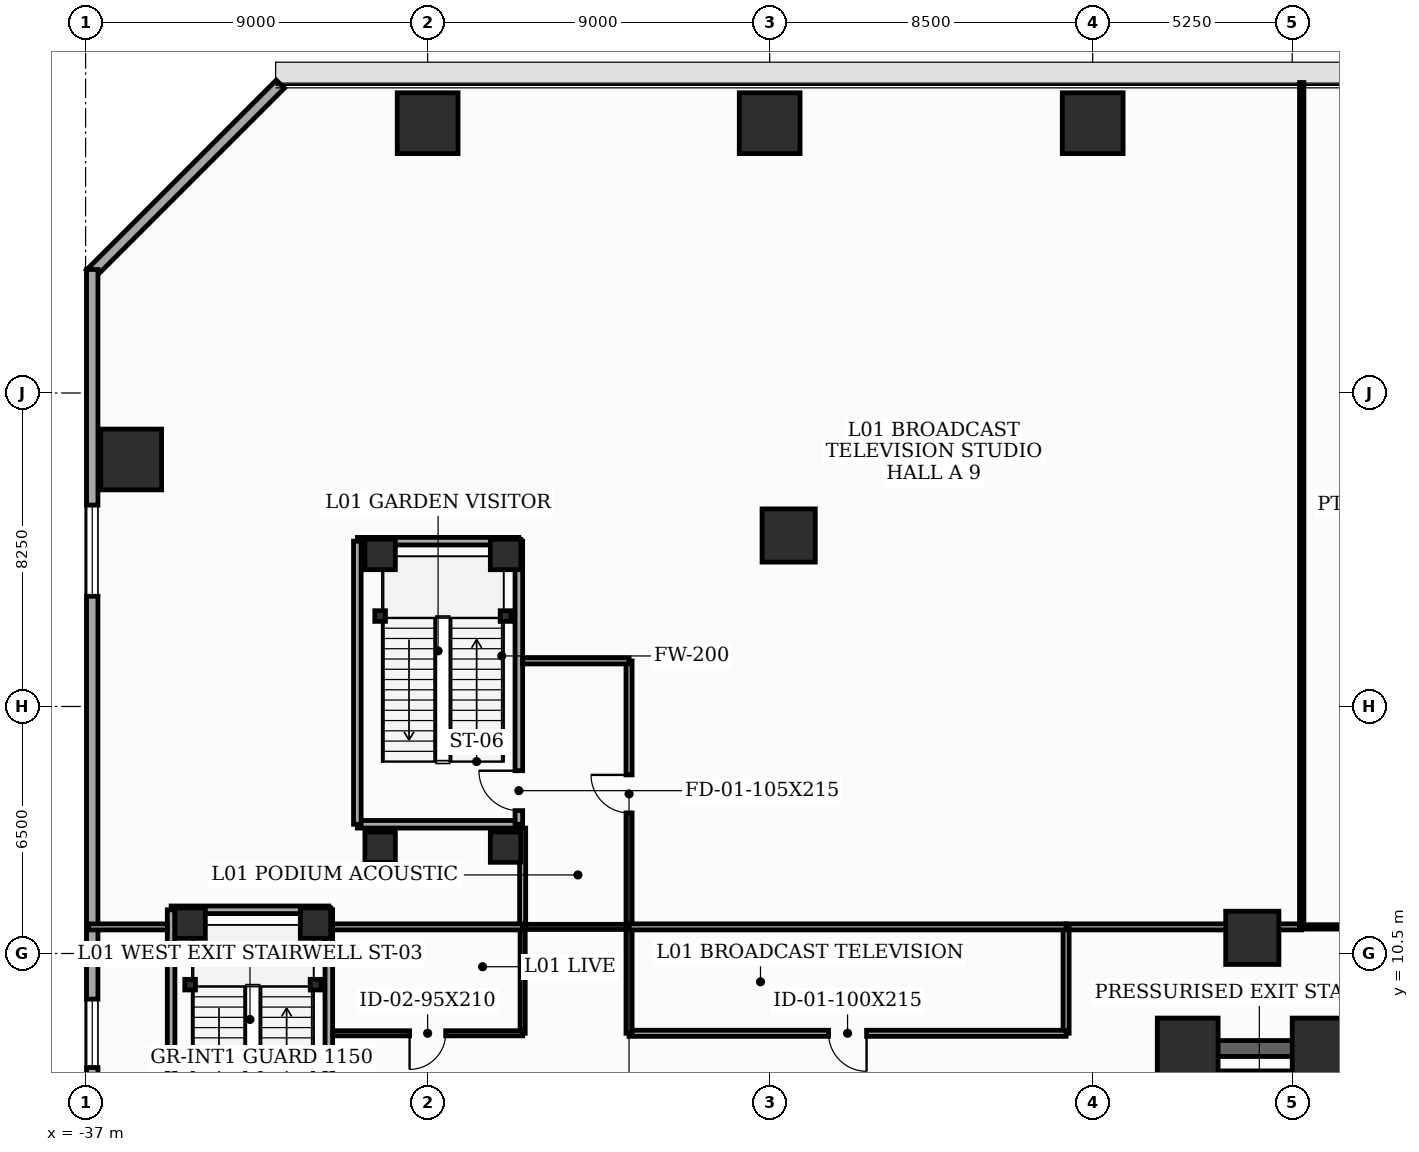
"""IFC4 building model, lengths in metres.
Left out: names, types, materials, properties, quantities, classifications, styles, units other than length and angle.
Written with IfcOpenShell. Run it as: python <this file> out.ifc"""

import sys

from ifc_helpers import new_model, si_unit, direction, frame, frame_2d, origin, origin_2d, place, context, subcontext, project, spatial, rectangle, i_section, extrude, element, fill, save


model = new_model("IFC4")
c1 = context("Model", 3, precision=1e-05, world=origin(), true_north=direction((0.0, 1.0)))
c2 = subcontext(c1, "Body", "Model", "MODEL_VIEW")
j1 = project(units=[si_unit("LENGTHUNIT", "METRE"), si_unit("PLANEANGLEUNIT", "RADIAN")], contexts=[c1])
p1 = place(None, origin())
s1 = spatial("IfcSite", under=j1, at=p1, CompositionType="ELEMENT")
p2 = place(p1, origin())
s2 = spatial("IfcBuilding", under=s1, at=p2, CompositionType="ELEMENT")
p3 = place(p2, frame((0.0, 0.0, 5.2)))
s3 = spatial("IfcBuildingStorey", under=s2, at=p3, CompositionType="ELEMENT", Elevation=5.2)
for number, where, z_axis, x_axis in (
    (1, (-4.45, 8.0, 0.0), (0.0, 0.0, 1.0), (1.0, 0.0, 0.0)),
    (2, (-8.0, 8.0, 0.0), (0.0, 0.0, 1.0), (1.0, 0.0, 0.0)),
):
    element("IfcColumn", number, at=place(p3, frame(where, z_axis=z_axis, x_axis=x_axis)), inside=s3, PredefinedType="COLUMN", context=c2, shape_type="SweptSolid", body=[
        extrude(rectangle(XDim=1.6, YDim=1.6, at=origin_2d()), origin(), (0.0, 0.0, 1.0), 5.2),
    ])
p4 = place(p3, frame((-6.3, 10.912, 0.0), z_axis=(0.0, 0.0, 1.0), x_axis=(1.0, 0.0, 0.0)))
e3 = element("IfcColumn", 3, at=p4, inside=s3, PredefinedType="COLUMN", context=c2, shape_type="SweptSolid", body=[
    extrude(rectangle(XDim=1.4, YDim=1.4, at=origin_2d()), origin(), (0.0, 0.0, 1.0), 5.2),
])
for number, where, z_axis, x_axis in (
    (4, (-10.5, 32.35, 0.0), (0.0, 0.0, 1.0), (1.0, 0.0, 0.0)),
    (5, (-19.0, 32.35, 0.0), (0.0, 0.0, 1.0), (1.0, 0.0, 0.0)),
    (6, (-28.0, 32.35, 0.0), (0.0, 0.0, 1.0), (1.0, 0.0, 0.0)),
    (7, (-35.8, 23.5, 0.0), (0.0, 0.0, 1.0), (1.0, 0.0, 0.0)),
):
    element("IfcColumn", number, at=place(p3, frame(where, z_axis=z_axis, x_axis=x_axis)), inside=s3, PredefinedType="COLUMN", context=c2, shape_type="SweptSolid", body=[
        extrude(rectangle(XDim=1.6, YDim=1.6, at=origin_2d()), origin(), (0.0, 0.0, 1.0), 5.2),
    ])
p5 = place(p3, frame((-18.5, 21.5, 0.0), z_axis=(0.0, 0.0, 1.0), x_axis=(1.0, 0.0, 0.0)))
e8 = element("IfcColumn", 8, at=p5, inside=s3, PredefinedType="COLUMN", context=c2, shape_type="SweptSolid", body=[
    extrude(rectangle(XDim=1.4, YDim=1.4, at=origin_2d()), origin(), (0.0, 0.0, 1.0), 5.2),
])
for number, where, z_axis, x_axis in (
    (9, (-30.95, 11.3, 0.0), (0.0, 0.0, 1.0), (1.0, 0.0, 0.0)),
    (10, (-34.25, 11.3, 0.0), (0.0, 0.0, 1.0), (1.0, 0.0, 0.0)),
):
    element("IfcColumn", number, at=place(p3, frame(where, z_axis=z_axis, x_axis=x_axis)), inside=s3, PredefinedType="COLUMN", context=c2, shape_type="SweptSolid", body=[
        extrude(rectangle(XDim=0.8, YDim=0.8, at=origin_2d()), origin(), (0.0, 0.0, 1.0), 5.2),
    ])
for number, where, z_axis, x_axis in (
    (11, (-34.25, 9.68, 0.0), (0.0, 0.0, 1.0), (1.0, 0.0, 0.0)),
    (12, (-30.95, 9.68, 0.0), (0.0, 0.0, 1.0), (1.0, 0.0, 0.0)),
):
    element("IfcColumn", number, at=place(p3, frame(where, z_axis=z_axis, x_axis=x_axis)), inside=s3, PredefinedType="PILASTER", context=c2, shape_type="SweptSolid", body=[
        extrude(i_section(OverallWidth=0.28, OverallDepth=0.28, WebThickness=0.01, FlangeThickness=0.018, at=origin_2d()), origin(), (0.0, 0.0, 1.0), 5.2),
    ])
for number, where, z_axis, x_axis in (
    (13, (-29.25, 13.3, 0.0), (0.0, 0.0, 1.0), (1.0, 0.0, 0.0)),
    (14, (-25.95, 13.3, 0.0), (0.0, 0.0, 1.0), (1.0, 0.0, 0.0)),
    (15, (-25.95, 21.0, 0.0), (0.0, 0.0, 1.0), (1.0, 0.0, 0.0)),
    (16, (-29.25, 21.0, 0.0), (0.0, 0.0, 1.0), (1.0, 0.0, 0.0)),
):
    element("IfcColumn", number, at=place(p3, frame(where, z_axis=z_axis, x_axis=x_axis)), inside=s3, PredefinedType="COLUMN", context=c2, shape_type="SweptSolid", body=[
        extrude(rectangle(XDim=0.8, YDim=0.8, at=origin_2d()), origin(), (0.0, 0.0, 1.0), 5.2),
    ])
for number, where, z_axis, x_axis in (
    (17, (-29.25, 19.38, 0.0), (0.0, 0.0, 1.0), (1.0, 0.0, 0.0)),
    (18, (-25.95, 19.38, 0.0), (0.0, 0.0, 1.0), (1.0, 0.0, 0.0)),
):
    element("IfcColumn", number, at=place(p3, frame(where, z_axis=z_axis, x_axis=x_axis)), inside=s3, PredefinedType="PILASTER", context=c2, shape_type="SweptSolid", body=[
        extrude(i_section(OverallWidth=0.28, OverallDepth=0.28, WebThickness=0.01, FlangeThickness=0.018, at=origin_2d()), origin(), (0.0, 0.0, 1.0), 5.2),
    ])
p6 = place(p3, frame((-31.876, 33.376, 0.0), z_axis=(0.0, 0.0, 1.0), x_axis=(-0.707106781187, -0.707106781187, 0.0)))
e19 = element("IfcWall", 19, at=p6, inside=s3, PredefinedType="SOLIDWALL", context=c2, shape_type="SweptSolid", body=[
    extrude(rectangle(XDim=7.071, YDim=0.3, at=frame_2d((3.536, 0.0))), origin(), (0.0, 0.0, 1.0), 4.95),
])
p7 = place(p3, frame((-36.825, 28.5, 0.0), z_axis=(0.0, 0.0, 1.0), x_axis=(0.0, -1.0, 0.0)))
e20 = element("IfcWall", 20, at=p7, inside=s3, PredefinedType="SOLIDWALL", context=c2, shape_type="SweptSolid", body=[
    extrude(rectangle(XDim=48.0, YDim=0.3, at=frame_2d((24.0, 0.0))), origin(), (0.0, 0.0, 1.0), 4.95),
])
p8 = place(p7, frame((6.2, 0.0, 0.9)))
e21 = element("IfcOpeningElement", 21, at=p8, cuts=e20, PredefinedType="OPENING", context=c2, shape_type="SweptSolid", body=[
    extrude(rectangle(XDim=2.4, YDim=1.35, at=frame_2d((1.2, 0.675))), frame((0.0, 0.16, 0.0), z_axis=(0.0, -1.0, 0.0), x_axis=(1.0, 0.0, 0.0)), (0.0, 0.0, 1.0), 0.32),
])
p9 = place(p7, frame((19.2, 0.0, 0.9)))
e22 = element("IfcOpeningElement", 22, at=p9, cuts=e20, PredefinedType="OPENING", context=c2, shape_type="SweptSolid", body=[
    extrude(rectangle(XDim=1.8, YDim=1.35, at=frame_2d((0.9, 0.675))), frame((0.0, 0.16, 0.0), z_axis=(0.0, -1.0, 0.0), x_axis=(1.0, 0.0, 0.0)), (0.0, 0.0, 1.0), 0.32),
])
p10 = place(p7, frame((36.2, 0.0, 0.9)))
e23 = element("IfcOpeningElement", 23, at=p10, cuts=e20, PredefinedType="OPENING", context=c2, shape_type="SweptSolid", body=[
    extrude(rectangle(XDim=2.4, YDim=1.35, at=frame_2d((1.2, 0.675))), frame((0.0, 0.16, 0.0), z_axis=(0.0, -1.0, 0.0), x_axis=(1.0, 0.0, 0.0)), (0.0, 0.0, 1.0), 0.32),
])
p11 = place(p3, frame((-8.0, -8.0, 0.0), z_axis=(0.0, 0.0, 1.0), x_axis=(0.0, 1.0, 0.0)))
e24 = element("IfcWall", 24, at=p11, inside=s3, PredefinedType="SHEAR", context=c2, shape_type="SweptSolid", body=[
    extrude(rectangle(XDim=16.0, YDim=0.42, at=frame_2d((8.0, 0.0))), origin(), (0.0, 0.0, 1.0), 4.95),
])
p12 = place(p11, frame((1.002, 0.0, 0.0)))
e25 = element("IfcOpeningElement", 25, at=p12, cuts=e24, PredefinedType="OPENING", context=c2, shape_type="SweptSolid", body=[
    extrude(rectangle(XDim=0.85, YDim=2.02, at=frame_2d((0.425, 1.01))), frame((0.0, 0.22, 0.0), z_axis=(0.0, -1.0, 0.0), x_axis=(1.0, 0.0, 0.0)), (0.0, 0.0, 1.0), 0.44),
])
p13 = place(p11, frame((5.35, 0.0, 0.0)))
e26 = element("IfcOpeningElement", 26, at=p13, cuts=e24, PredefinedType="OPENING", context=c2, shape_type="SweptSolid", body=[
    extrude(rectangle(XDim=1.05, YDim=2.15, at=frame_2d((0.525, 1.075))), frame((0.0, 0.22, 0.0), z_axis=(0.0, -1.0, 0.0), x_axis=(1.0, 0.0, 0.0)), (0.0, 0.0, 1.0), 0.44),
])
p14 = place(p3, frame((-8.0, 8.0, 0.0), z_axis=(0.0, 0.0, 1.0), x_axis=(1.0, 0.0, 0.0)))
e27 = element("IfcWall", 27, at=p14, inside=s3, PredefinedType="SHEAR", context=c2, shape_type="SweptSolid", body=[
    extrude(rectangle(XDim=16.0, YDim=0.42, at=frame_2d((8.0, 0.0))), origin(), (0.0, 0.0, 1.0), 4.95),
])
p15 = place(p14, frame((7.1, 0.0, 0.0)))
e28 = element("IfcOpeningElement", 28, at=p15, cuts=e27, PredefinedType="OPENING", context=c2, shape_type="SweptSolid", body=[
    extrude(rectangle(XDim=1.8, YDim=2.15, at=frame_2d((0.9, 1.075))), frame((0.0, 0.22, 0.0), z_axis=(0.0, -1.0, 0.0), x_axis=(1.0, 0.0, 0.0)), (0.0, 0.0, 1.0), 0.44),
])
p16 = place(p3, frame((-4.45, -7.79, 0.0), z_axis=(0.0, 0.0, 1.0), x_axis=(0.0, 1.0, 0.0)))
e29 = element("IfcWall", 29, at=p16, inside=s3, PredefinedType="SHEAR", context=c2, shape_type="SweptSolid", body=[
    extrude(rectangle(XDim=15.58, YDim=0.3, at=frame_2d((7.79, 0.0))), origin(), (0.0, 0.0, 1.0), 4.95),
])
p17 = place(p3, frame((-7.79, 7.26, 0.0), z_axis=(0.0, 0.0, 1.0), x_axis=(1.0, 0.0, 0.0)))
e30 = element("IfcWall", 30, at=p17, inside=s3, PredefinedType="SHEAR", context=c2, shape_type="SweptSolid", body=[
    extrude(rectangle(XDim=3.34, YDim=0.3, at=frame_2d((1.67, 0.0))), origin(), (0.0, 0.0, 1.0), 4.95),
])
p18 = place(p3, frame((-30.6, 4.2, 0.0), z_axis=(0.0, 0.0, 1.0), x_axis=(0.0, 1.0, 0.0)))
e31 = element("IfcWall", 31, at=p18, inside=s3, PredefinedType="SOLIDWALL", context=c2, shape_type="SweptSolid", body=[
    extrude(rectangle(XDim=7.45, YDim=0.2, at=frame_2d((3.725, 0.0))), origin(), (0.0, 0.0, 1.0), 4.95),
])
p19 = place(p18, frame((0.36, 0.0, 0.0)))
e32 = element("IfcOpeningElement", 32, at=p19, cuts=e31, PredefinedType="OPENING", context=c2, shape_type="SweptSolid", body=[
    extrude(rectangle(XDim=1.05, YDim=2.15, at=frame_2d((0.525, 1.075))), frame((0.0, 0.11, 0.0), z_axis=(0.0, -1.0, 0.0), x_axis=(1.0, 0.0, 0.0)), (0.0, 0.0, 1.0), 0.22),
])
p20 = place(p3, frame((-30.6, 11.65, 0.0), z_axis=(0.0, 0.0, 1.0), x_axis=(-1.0, 0.0, 0.0)))
e33 = element("IfcWall", 33, at=p20, inside=s3, PredefinedType="SOLIDWALL", context=c2, shape_type="SweptSolid", body=[
    extrude(rectangle(XDim=4.15, YDim=0.2, at=frame_2d((2.075, 0.0))), origin(), (0.0, 0.0, 1.0), 4.95),
])
p21 = place(p3, frame((-34.75, 11.65, 0.0), z_axis=(0.0, 0.0, 1.0), x_axis=(0.0, -1.0, 0.0)))
e34 = element("IfcWall", 34, at=p21, inside=s3, PredefinedType="SOLIDWALL", context=c2, shape_type="SweptSolid", body=[
    extrude(rectangle(XDim=7.45, YDim=0.2, at=frame_2d((3.725, 0.0))), origin(), (0.0, 0.0, 1.0), 4.95),
])
p22 = place(p3, frame((-29.85, 13.9, 0.0), z_axis=(0.0, 0.0, 1.0), x_axis=(1.0, 0.0, 0.0)))
e35 = element("IfcWall", 35, at=p22, inside=s3, PredefinedType="SOLIDWALL", context=c2, shape_type="SweptSolid", body=[
    extrude(rectangle(XDim=4.25, YDim=0.2, at=frame_2d((2.125, 0.0))), origin(), (0.0, 0.0, 1.0), 4.435),
])
p23 = place(p3, frame((-25.6, 13.9, 0.0), z_axis=(0.0, 0.0, 1.0), x_axis=(0.0, 1.0, 0.0)))
e36 = element("IfcWall", 36, at=p23, inside=s3, PredefinedType="SOLIDWALL", context=c2, shape_type="SweptSolid", body=[
    extrude(rectangle(XDim=7.45, YDim=0.2, at=frame_2d((3.725, 0.0))), origin(), (0.0, 0.0, 1.0), 4.435),
])
p24 = place(p23, frame((0.36, 0.0, 0.0)))
e37 = element("IfcOpeningElement", 37, at=p24, cuts=e36, PredefinedType="OPENING", context=c2, shape_type="SweptSolid", body=[
    extrude(rectangle(XDim=1.05, YDim=2.15, at=frame_2d((0.525, 1.075))), frame((0.0, 0.11, 0.0), z_axis=(0.0, -1.0, 0.0), x_axis=(1.0, 0.0, 0.0)), (0.0, 0.0, 1.0), 0.22),
])
p25 = place(p3, frame((-25.6, 21.35, 0.0), z_axis=(0.0, 0.0, 1.0), x_axis=(-1.0, 0.0, 0.0)))
e38 = element("IfcWall", 38, at=p25, inside=s3, PredefinedType="SOLIDWALL", context=c2, shape_type="SweptSolid", body=[
    extrude(rectangle(XDim=4.25, YDim=0.2, at=frame_2d((2.125, 0.0))), origin(), (0.0, 0.0, 1.0), 4.95),
])
p26 = place(p3, frame((-29.85, 21.35, 0.0), z_axis=(0.0, 0.0, 1.0), x_axis=(0.0, -1.0, 0.0)))
e39 = element("IfcWall", 39, at=p26, inside=s3, PredefinedType="SOLIDWALL", context=c2, shape_type="SweptSolid", body=[
    extrude(rectangle(XDim=7.45, YDim=0.2, at=frame_2d((3.725, 0.0))), origin(), (0.0, 0.0, 1.0), 4.435),
])
p27 = place(p3, frame((-22.7, 11.2, 0.0), z_axis=(0.0, 0.0, 1.0), x_axis=(-1.0, 0.0, 0.0)))
e40 = element("IfcWall", 40, at=p27, inside=s3, PredefinedType="PARTITIONING", context=c2, shape_type="SweptSolid", body=[
    extrude(rectangle(XDim=2.8, YDim=0.135, at=frame_2d((1.4, 0.0))), origin(), (0.0, 0.0, 1.0), 4.95),
])
p28 = place(p3, frame((11.2, 11.2, 0.0), z_axis=(0.0, 0.0, 1.0), x_axis=(-1.0, 0.0, 0.0)))
e41 = element("IfcWall", 41, at=p28, inside=s3, PredefinedType="PARTITIONING", context=c2, shape_type="SweptSolid", body=[
    extrude(rectangle(XDim=16.2, YDim=0.115, at=frame_2d((8.1, 0.0))), origin(), (0.0, 0.0, 1.0), 3.435),
])
p29 = place(p28, frame((7.625, 0.0, 0.0)))
e42 = element("IfcOpeningElement", 42, at=p29, cuts=e41, PredefinedType="OPENING", context=c2, shape_type="SweptSolid", body=[
    extrude(rectangle(XDim=0.95, YDim=2.1, at=frame_2d((0.475, 1.05))), frame((0.0, 0.067, 0.0), z_axis=(0.0, -1.0, 0.0), x_axis=(1.0, 0.0, 0.0)), (0.0, 0.0, 1.0), 0.135),
])
p30 = place(p3, frame((-5.0, 11.2, 0.0), z_axis=(0.0, 0.0, 1.0), x_axis=(-1.0, 0.0, 0.0)))
e43 = element("IfcWall", 43, at=p30, inside=s3, PredefinedType="PARTITIONING", context=c2, shape_type="SweptSolid", body=[
    extrude(rectangle(XDim=6.2, YDim=0.16, at=frame_2d((3.1, 0.0))), origin(), (0.0, 0.0, 1.0), 3.435),
])
p31 = place(p3, frame((-11.2, 11.2, 0.0), z_axis=(0.0, 0.0, 1.0), x_axis=(0.0, -1.0, 0.0)))
e44 = element("IfcWall", 44, at=p31, inside=s3, PredefinedType="PARTITIONING", context=c2, shape_type="SweptSolid", body=[
    extrude(rectangle(XDim=2.8, YDim=0.16, at=frame_2d((1.4, 0.0))), origin(), (0.0, 0.0, 1.0), 4.95),
])
p32 = place(p3, frame((-11.2, 8.4, 0.0), z_axis=(0.0, 0.0, 1.0), x_axis=(-1.0, 0.0, 0.0)))
e45 = element("IfcWall", 45, at=p32, inside=s3, PredefinedType="PARTITIONING", context=c2, shape_type="SweptSolid", body=[
    extrude(rectangle(XDim=11.5, YDim=0.16, at=frame_2d((5.75, 0.0))), origin(), (0.0, 0.0, 1.0), 4.235),
])
p33 = place(p32, frame((5.25, 0.0, 0.0)))
e46 = element("IfcOpeningElement", 46, at=p33, cuts=e45, PredefinedType="OPENING", context=c2, shape_type="SweptSolid", body=[
    extrude(rectangle(XDim=1.0, YDim=2.15, at=frame_2d((0.5, 1.075))), frame((0.0, 0.09, 0.0), z_axis=(0.0, -1.0, 0.0), x_axis=(1.0, 0.0, 0.0)), (0.0, 0.0, 1.0), 0.18),
])
p34 = place(p3, frame((-22.7, 8.4, 0.0), z_axis=(0.0, 0.0, 1.0), x_axis=(0.0, 1.0, 0.0)))
e47 = element("IfcWall", 47, at=p34, inside=s3, PredefinedType="PARTITIONING", context=c2, shape_type="SweptSolid", body=[
    extrude(rectangle(XDim=2.8, YDim=0.16, at=frame_2d((1.4, 0.0))), origin(), (0.0, 0.0, 1.0), 4.95),
])
p35 = place(p3, frame((-25.5, 11.2, 0.0), z_axis=(0.0, 0.0, 1.0), x_axis=(0.0, -1.0, 0.0)))
e48 = element("IfcWall", 48, at=p35, inside=s3, PredefinedType="PARTITIONING", context=c2, shape_type="SweptSolid", body=[
    extrude(rectangle(XDim=2.8, YDim=0.135, at=frame_2d((1.4, 0.0))), origin(), (0.0, 0.0, 1.0), 4.95),
])
p36 = place(p3, frame((-25.5, 8.4, 0.0), z_axis=(0.0, 0.0, 1.0), x_axis=(-1.0, 0.0, 0.0)))
e49 = element("IfcWall", 49, at=p36, inside=s3, PredefinedType="PARTITIONING", context=c2, shape_type="SweptSolid", body=[
    extrude(rectangle(XDim=5.0, YDim=0.135, at=frame_2d((2.5, 0.0))), origin(), (0.0, 0.0, 1.0), 4.95),
])
p37 = place(p36, frame((2.025, 0.0, 0.0)))
e50 = element("IfcOpeningElement", 50, at=p37, cuts=e49, PredefinedType="OPENING", context=c2, shape_type="SweptSolid", body=[
    extrude(rectangle(XDim=0.95, YDim=2.1, at=frame_2d((0.475, 1.05))), frame((0.0, 0.077, 0.0), z_axis=(0.0, -1.0, 0.0), x_axis=(1.0, 0.0, 0.0)), (0.0, 0.0, 1.0), 0.155),
])
p38 = place(p3, frame((-25.5, 13.8, 0.0), z_axis=(0.0, 0.0, 1.0), x_axis=(0.0, -1.0, 0.0)))
e51 = element("IfcWall", 51, at=p38, inside=s3, PredefinedType="PARTITIONING", context=c2, shape_type="SweptSolid", body=[
    extrude(rectangle(XDim=2.6, YDim=0.16, at=frame_2d((1.3, 0.0))), origin(), (0.0, 0.0, 1.0), 4.435),
])
p39 = place(p3, frame((-22.7, 11.2, 0.0), z_axis=(0.0, 0.0, 1.0), x_axis=(0.0, 1.0, 0.0)))
e52 = element("IfcWall", 52, at=p39, inside=s3, PredefinedType="PARTITIONING", context=c2, shape_type="SweptSolid", body=[
    extrude(rectangle(XDim=7.0, YDim=0.16, at=frame_2d((3.5, 0.0))), origin(), (0.0, 0.0, 1.0), 4.435),
])
p40 = place(p39, frame((3.0, 0.0, 0.0)))
e53 = element("IfcOpeningElement", 53, at=p40, cuts=e52, PredefinedType="OPENING", context=c2, shape_type="SweptSolid", body=[
    extrude(rectangle(XDim=1.0, YDim=2.15, at=frame_2d((0.5, 1.075))), frame((0.0, 0.09, 0.0), z_axis=(0.0, -1.0, 0.0), x_axis=(1.0, 0.0, 0.0)), (0.0, 0.0, 1.0), 0.18),
])
p41 = place(p3, frame((-22.7, 18.2, 0.0), z_axis=(0.0, 0.0, 1.0), x_axis=(-1.0, 0.0, 0.0)))
e54 = element("IfcWall", 54, at=p41, inside=s3, PredefinedType="PARTITIONING", context=c2, shape_type="SweptSolid", body=[
    extrude(rectangle(XDim=2.8, YDim=0.16, at=frame_2d((1.4, 0.0))), origin(), (0.0, 0.0, 1.0), 4.95),
])
p42 = place(p3, frame((-34.85, 11.2, 0.0), z_axis=(0.0, 0.0, 1.0), x_axis=(-1.0, 0.0, 0.0)))
e55 = element("IfcWall", 55, at=p42, inside=s3, PredefinedType="PARTITIONING", context=c2, shape_type="SweptSolid", body=[
    extrude(rectangle(XDim=2.07, YDim=0.16, at=frame_2d((1.035, 0.0))), origin(), (0.0, 0.0, 1.0), 4.235),
])
p43 = place(p3, frame((-5.0, 33.42, 0.0), z_axis=(0.0, 0.0, 1.0), x_axis=(0.0, -1.0, 0.0)))
e56 = element("IfcWall", 56, at=p43, inside=s3, PredefinedType="PARTITIONING", context=c2, shape_type="SweptSolid", body=[
    extrude(rectangle(XDim=22.22, YDim=0.115, at=frame_2d((11.11, 0.0))), origin(), (0.0, 0.0, 1.0), 4.235),
])
p44 = place(p3, frame((-22.7, 11.2, 0.0), z_axis=(0.0, 0.0, 1.0), x_axis=(1.0, 0.0, 0.0)))
e57 = element("IfcWall", 57, at=p44, inside=s3, PredefinedType="PARTITIONING", context=c2, shape_type="SweptSolid", body=[
    extrude(rectangle(XDim=11.5, YDim=0.16, at=frame_2d((5.75, 0.0))), origin(), (0.0, 0.0, 1.0), 4.235),
])
p45 = place(p3, frame((-30.5, 11.2, 0.0), z_axis=(0.0, 0.0, 1.0), x_axis=(1.0, 0.0, 0.0)))
e58 = element("IfcWall", 58, at=p45, inside=s3, PredefinedType="PARTITIONING", context=c2, shape_type="SweptSolid", body=[
    extrude(rectangle(XDim=5.0, YDim=0.16, at=frame_2d((2.5, 0.0))), origin(), (0.0, 0.0, 1.0), 4.95),
])
p46 = place(p8, origin())
e59 = element("IfcWindow", 59, at=p46, inside=s3, PartitioningType="SINGLE_PANEL", PredefinedType="WINDOW", context=c2, shape_type="SweptSolid", body=[
    extrude(rectangle(XDim=2.4, YDim=1.35, at=frame_2d((1.2, 0.675))), frame((0.0, 0.03, 0.0), z_axis=(0.0, -1.0, 0.0), x_axis=(1.0, 0.0, 0.0)), (0.0, 0.0, 1.0), 0.06),
])
fill(e21, e59)
p47 = place(p9, origin())
e60 = element("IfcWindow", 60, at=p47, inside=s3, PartitioningType="SINGLE_PANEL", PredefinedType="WINDOW", context=c2, shape_type="SweptSolid", body=[
    extrude(rectangle(XDim=1.8, YDim=1.35, at=frame_2d((0.9, 0.675))), frame((0.0, 0.03, 0.0), z_axis=(0.0, -1.0, 0.0), x_axis=(1.0, 0.0, 0.0)), (0.0, 0.0, 1.0), 0.06),
])
fill(e22, e60)
p48 = place(p24, origin())
e61 = element("IfcDoor", 61, at=p48, inside=s3, OperationType="SINGLE_SWING_RIGHT", PredefinedType="DOOR", context=c2, shape_type="SweptSolid", body=[
    extrude(rectangle(XDim=1.05, YDim=2.15, at=frame_2d((0.525, 1.075))), frame((0.0, 0.025, 0.0), z_axis=(0.0, -1.0, 0.0), x_axis=(1.0, 0.0, 0.0)), (0.0, 0.0, 1.0), 0.05),
])
fill(e37, e61)
p49 = place(p33, origin())
e62 = element("IfcDoor", 62, at=p49, inside=s3, OperationType="SINGLE_SWING_LEFT", PredefinedType="DOOR", context=c2, shape_type="SweptSolid", body=[
    extrude(rectangle(XDim=1.0, YDim=2.15, at=frame_2d((0.5, 1.075))), frame((0.0, 0.025, 0.0), z_axis=(0.0, -1.0, 0.0), x_axis=(1.0, 0.0, 0.0)), (0.0, 0.0, 1.0), 0.05),
])
fill(e46, e62)
p50 = place(p37, origin())
e63 = element("IfcDoor", 63, at=p50, inside=s3, OperationType="SINGLE_SWING_RIGHT", PredefinedType="DOOR", context=c2, shape_type="SweptSolid", body=[
    extrude(rectangle(XDim=0.95, YDim=2.1, at=frame_2d((0.475, 1.05))), frame((0.0, 0.025, 0.0), z_axis=(0.0, -1.0, 0.0), x_axis=(1.0, 0.0, 0.0)), (0.0, 0.0, 1.0), 0.05),
])
fill(e50, e63)
p51 = place(p40, origin())
e64 = element("IfcDoor", 64, at=p51, inside=s3, OperationType="SINGLE_SWING_RIGHT", PredefinedType="DOOR", context=c2, shape_type="SweptSolid", body=[
    extrude(rectangle(XDim=1.0, YDim=2.15, at=frame_2d((0.5, 1.075))), frame((0.0, 0.025, 0.0), z_axis=(0.0, -1.0, 0.0), x_axis=(1.0, 0.0, 0.0)), (0.0, 0.0, 1.0), 0.05),
])
fill(e53, e64)
save(model, sys.argv[1])
